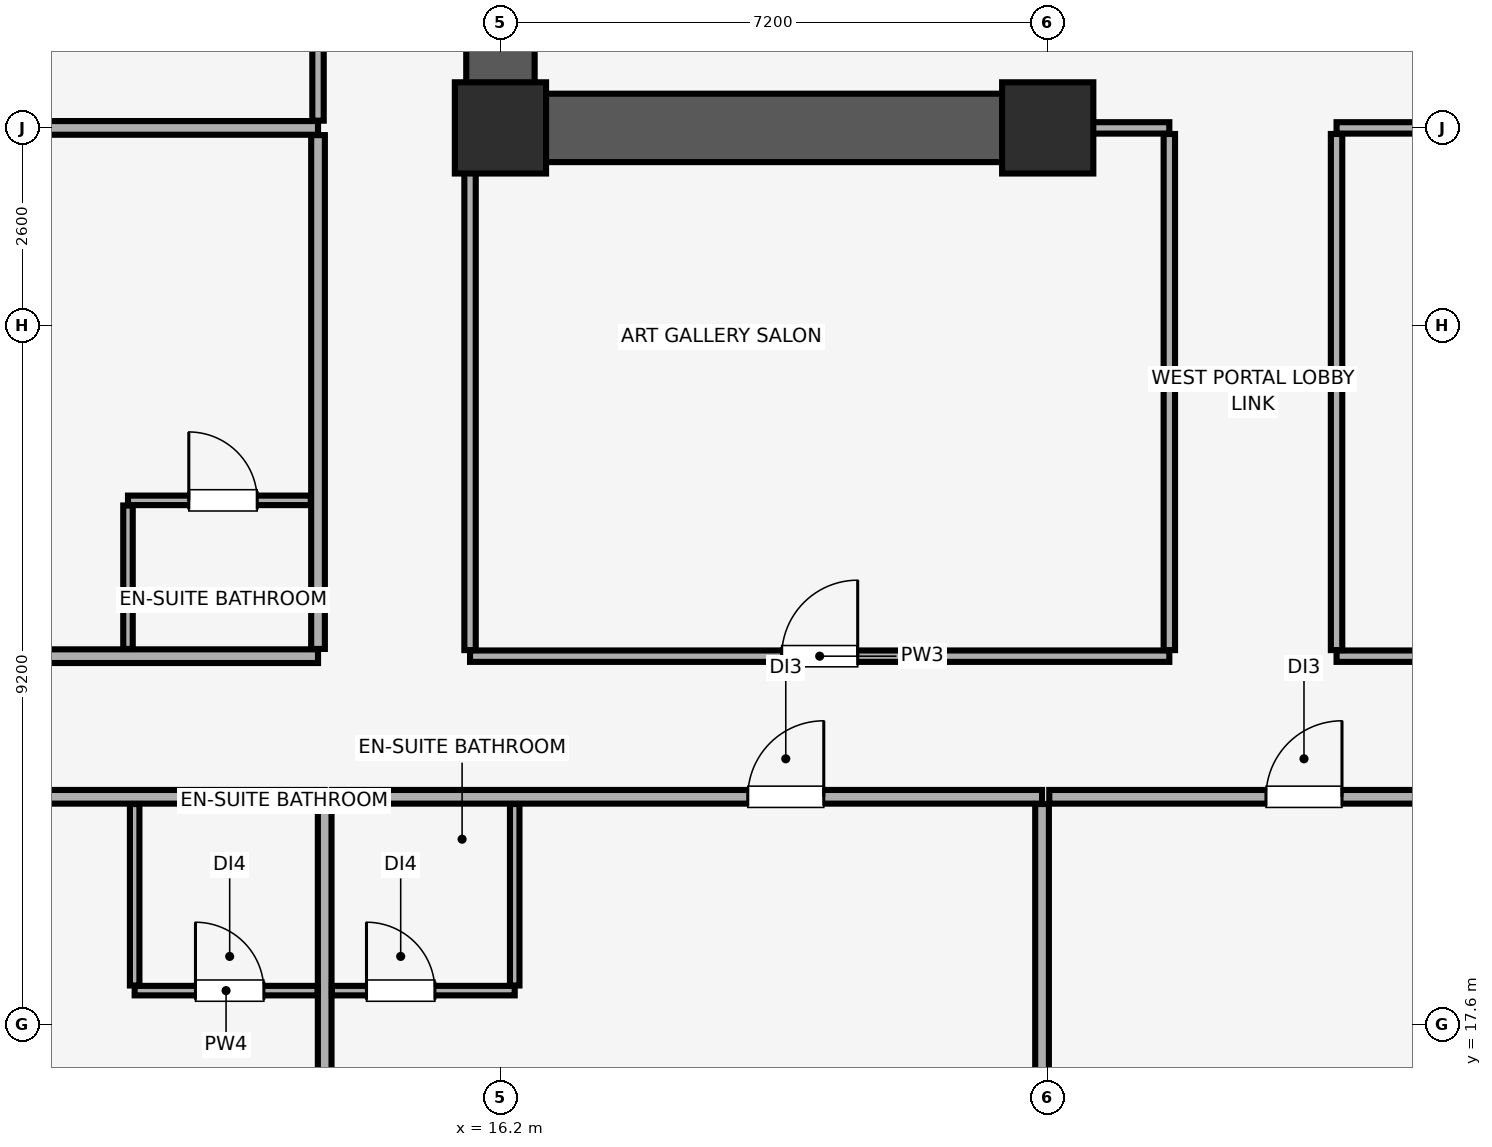
"""IFC4 building model, lengths in metres.
Left out: names, types, materials, properties, quantities, classifications, styles, units other than length and angle.
Written with IfcOpenShell. Run it as: python <this file> out.ifc"""

import sys

from ifc_helpers import new_model, si_unit, direction, frame, frame_2d, origin, origin_2d, place, context, subcontext, project, spatial, rectangle, extrude, element, fill, save


model = new_model("IFC4")
c1 = context("Model", 3, precision=1e-05, world=origin(), true_north=direction((0.0, 1.0)))
c2 = subcontext(c1, "Body", "Model", "MODEL_VIEW")
j1 = project(units=[si_unit("LENGTHUNIT", "METRE"), si_unit("PLANEANGLEUNIT", "RADIAN")], contexts=[c1])
p1 = place(None, origin())
s1 = spatial("IfcSite", under=j1, at=p1, CompositionType="ELEMENT")
p2 = place(p1, origin())
s2 = spatial("IfcBuilding", under=s1, at=p2, CompositionType="ELEMENT")
p3 = place(p2, frame((0.0, 0.0, 93.05)))
s3 = spatial("IfcBuildingStorey", under=s2, at=p3, CompositionType="ELEMENT", Elevation=93.05)
for number, where, z_axis, x_axis in (
    (1, (16.2, 29.4, 0.0), (0.0, 0.0, 1.0), (1.0, 0.0, 0.0)),
    (2, (23.4, 29.4, 0.0), (0.0, 0.0, 1.0), (1.0, 0.0, 0.0)),
):
    element("IfcColumn", number, at=place(p3, frame(where, z_axis=z_axis, x_axis=x_axis)), inside=s3, PredefinedType="COLUMN", context=c2, shape_type="SweptSolid", body=[
        extrude(rectangle(XDim=1.2, YDim=1.2, at=origin_2d()), origin(), (0.0, 0.0, 1.0), 3.51),
    ])
p4 = place(p3, frame((16.2, 29.4, 0.0), z_axis=(0.0, 0.0, 1.0), x_axis=(0.0, 1.0, 0.0)))
e3 = element("IfcWall", 3, at=p4, inside=s3, PredefinedType="SHEAR", context=c2, shape_type="SweptSolid", body=[
    extrude(rectangle(XDim=19.2, YDim=0.9, at=frame_2d((9.6, 0.0))), origin(), (0.0, 0.0, 1.0), 3.51),
])
p5 = place(p3, frame((16.655, 29.4, 0.0), z_axis=(0.0, 0.0, 1.0), x_axis=(1.0, 0.0, 0.0)))
e4 = element("IfcWall", 4, at=p5, inside=s3, PredefinedType="SHEAR", context=c2, shape_type="SweptSolid", body=[
    extrude(rectangle(XDim=6.945, YDim=0.9, at=frame_2d((3.473, 0.0))), origin(), (0.0, 0.0, 1.0), 3.51),
])
p6 = place(p3, frame((0.15, 20.6, 0.0), z_axis=(0.0, 0.0, 1.0), x_axis=(1.0, 0.0, 0.0)))
e5 = element("IfcWall", 5, at=p6, inside=s3, PredefinedType="PARTITIONING", context=c2, shape_type="SweptSolid", body=[
    extrude(rectangle(XDim=13.738, YDim=0.18, at=frame_2d((6.869, 0.0))), origin(), (0.0, 0.0, 1.0), 3.51),
])
p7 = place(p6, frame((5.685, 0.0, 0.0)))
e6 = element("IfcOpeningElement", 6, at=p7, cuts=e5, PredefinedType="OPENING", context=c2, shape_type="SweptSolid", body=[
    extrude(rectangle(XDim=1.0, YDim=2.15, at=frame_2d((0.5, 1.075))), frame((0.0, 0.1, 0.0), z_axis=(0.0, -1.0, 0.0), x_axis=(1.0, 0.0, 0.0)), (0.0, 0.0, 1.0), 0.2),
])
p8 = place(p3, frame((13.888, 0.15, 0.0), z_axis=(0.0, 0.0, 1.0), x_axis=(0.0, 1.0, 0.0)))
e7 = element("IfcWall", 7, at=p8, inside=s3, PredefinedType="PARTITIONING", context=c2, shape_type="SweptSolid", body=[
    extrude(rectangle(XDim=20.355, YDim=0.18, at=frame_2d((10.177, 0.0))), origin(), (0.0, 0.0, 1.0), 3.51),
])
p9 = place(p3, frame((11.388, 18.05, 0.0), z_axis=(0.0, 0.0, 1.0), x_axis=(1.0, 0.0, 0.0)))
e8 = element("IfcWall", 8, at=p9, inside=s3, PredefinedType="PARTITIONING", context=c2, shape_type="SweptSolid", body=[
    extrude(rectangle(XDim=2.405, YDim=0.125, at=frame_2d((1.203, 0.0))), origin(), (0.0, 0.0, 1.0), 3.51),
])
p10 = place(p9, frame((0.8, 0.0, 0.0)))
e9 = element("IfcOpeningElement", 9, at=p10, cuts=e8, PredefinedType="OPENING", context=c2, shape_type="SweptSolid", body=[
    extrude(rectangle(XDim=0.9, YDim=2.1, at=frame_2d((0.45, 1.05))), frame((0.0, 0.073, 0.0), z_axis=(0.0, -1.0, 0.0), x_axis=(1.0, 0.0, 0.0)), (0.0, 0.0, 1.0), 0.145),
])
p11 = place(p3, frame((11.388, 18.117, 0.0), z_axis=(0.0, 0.0, 1.0), x_axis=(0.0, 1.0, 0.0)))
e10 = element("IfcWall", 10, at=p11, inside=s3, PredefinedType="PARTITIONING", context=c2, shape_type="SweptSolid", body=[
    extrude(rectangle(XDim=2.387, YDim=0.125, at=frame_2d((1.194, 0.0))), origin(), (0.0, 0.0, 1.0), 3.51),
])
p12 = place(p3, frame((13.983, 20.6, 0.0), z_axis=(0.0, 0.0, 1.0), x_axis=(1.0, 0.0, 0.0)))
e11 = element("IfcWall", 11, at=p12, inside=s3, PredefinedType="PARTITIONING", context=c2, shape_type="SweptSolid", body=[
    extrude(rectangle(XDim=9.343, YDim=0.18, at=frame_2d((4.671, 0.0))), origin(), (0.0, 0.0, 1.0), 3.51),
])
p13 = place(p12, frame((5.471, 0.0, 0.0)))
e12 = element("IfcOpeningElement", 12, at=p13, cuts=e11, PredefinedType="OPENING", context=c2, shape_type="SweptSolid", body=[
    extrude(rectangle(XDim=1.0, YDim=2.15, at=frame_2d((0.5, 1.075))), frame((0.0, 0.1, 0.0), z_axis=(0.0, -1.0, 0.0), x_axis=(1.0, 0.0, 0.0)), (0.0, 0.0, 1.0), 0.2),
])
p14 = place(p3, frame((23.325, 0.15, 0.0), z_axis=(0.0, 0.0, 1.0), x_axis=(0.0, 1.0, 0.0)))
e13 = element("IfcWall", 13, at=p14, inside=s3, PredefinedType="PARTITIONING", context=c2, shape_type="SweptSolid", body=[
    extrude(rectangle(XDim=20.355, YDim=0.18, at=frame_2d((10.177, 0.0))), origin(), (0.0, 0.0, 1.0), 2.898),
])
p15 = place(p3, frame((13.983, 18.05, 0.0), z_axis=(0.0, 0.0, 1.0), x_axis=(1.0, 0.0, 0.0)))
e14 = element("IfcWall", 14, at=p15, inside=s3, PredefinedType="PARTITIONING", context=c2, shape_type="SweptSolid", body=[
    extrude(rectangle(XDim=2.405, YDim=0.125, at=frame_2d((1.203, 0.0))), origin(), (0.0, 0.0, 1.0), 3.51),
])
p16 = place(p15, frame((0.455, 0.0, 0.0)))
e15 = element("IfcOpeningElement", 15, at=p16, cuts=e14, PredefinedType="OPENING", context=c2, shape_type="SweptSolid", body=[
    extrude(rectangle(XDim=0.9, YDim=2.1, at=frame_2d((0.45, 1.05))), frame((0.0, 0.073, 0.0), z_axis=(0.0, -1.0, 0.0), x_axis=(1.0, 0.0, 0.0)), (0.0, 0.0, 1.0), 0.145),
])
p17 = place(p3, frame((16.388, 18.117, 0.0), z_axis=(0.0, 0.0, 1.0), x_axis=(0.0, 1.0, 0.0)))
e16 = element("IfcWall", 16, at=p17, inside=s3, PredefinedType="PARTITIONING", context=c2, shape_type="SweptSolid", body=[
    extrude(rectangle(XDim=2.387, YDim=0.125, at=frame_2d((1.194, 0.0))), origin(), (0.0, 0.0, 1.0), 2.977),
])
p18 = place(p3, frame((23.42, 20.6, 0.0), z_axis=(0.0, 0.0, 1.0), x_axis=(1.0, 0.0, 0.0)))
e17 = element("IfcWall", 17, at=p18, inside=s3, PredefinedType="PARTITIONING", context=c2, shape_type="SweptSolid", body=[
    extrude(rectangle(XDim=9.343, YDim=0.18, at=frame_2d((4.671, 0.0))), origin(), (0.0, 0.0, 1.0), 3.51),
])
p19 = place(p18, frame((2.851, 0.0, 0.0)))
e18 = element("IfcOpeningElement", 18, at=p19, cuts=e17, PredefinedType="OPENING", context=c2, shape_type="SweptSolid", body=[
    extrude(rectangle(XDim=1.0, YDim=2.15, at=frame_2d((0.5, 1.075))), frame((0.0, 0.1, 0.0), z_axis=(0.0, -1.0, 0.0), x_axis=(1.0, 0.0, 0.0)), (0.0, 0.0, 1.0), 0.2),
])
p20 = place(p3, frame((15.8, 22.45, 0.0), z_axis=(0.0, 0.0, 1.0), x_axis=(1.0, 0.0, 0.0)))
e19 = element("IfcWall", 19, at=p20, inside=s3, PredefinedType="PARTITIONING", context=c2, shape_type="SweptSolid", body=[
    extrude(rectangle(XDim=9.2, YDim=0.15, at=frame_2d((4.6, 0.0))), origin(), (0.0, 0.0, 1.0), 3.51),
])
p21 = place(p20, frame((4.1, 0.0, 0.0)))
e20 = element("IfcOpeningElement", 20, at=p21, cuts=e19, PredefinedType="OPENING", context=c2, shape_type="SweptSolid", body=[
    extrude(rectangle(XDim=1.0, YDim=2.15, at=frame_2d((0.5, 1.075))), frame((0.0, 0.085, 0.0), z_axis=(0.0, -1.0, 0.0), x_axis=(1.0, 0.0, 0.0)), (0.0, 0.0, 1.0), 0.17),
])
p22 = place(p3, frame((23.61, 29.4, 0.0), z_axis=(0.0, 0.0, 1.0), x_axis=(1.0, 0.0, 0.0)))
e21 = element("IfcWall", 21, at=p22, inside=s3, PredefinedType="PARTITIONING", context=c2, shape_type="SweptSolid", body=[
    extrude(rectangle(XDim=1.39, YDim=0.15, at=frame_2d((0.695, 0.0))), origin(), (0.0, 0.0, 1.0), 2.41),
])
p23 = place(p3, frame((15.8, 22.53, 0.0), z_axis=(0.0, 0.0, 1.0), x_axis=(0.0, 1.0, 0.0)))
e22 = element("IfcWall", 22, at=p23, inside=s3, PredefinedType="PARTITIONING", context=c2, shape_type="SweptSolid", body=[
    extrude(rectangle(XDim=6.86, YDim=0.15, at=frame_2d((3.43, 0.0))), origin(), (0.0, 0.0, 1.0), 3.51),
])
p24 = place(p3, frame((25.0, 22.53, 0.0), z_axis=(0.0, 0.0, 1.0), x_axis=(0.0, 1.0, 0.0)))
e23 = element("IfcWall", 23, at=p24, inside=s3, PredefinedType="PARTITIONING", context=c2, shape_type="SweptSolid", body=[
    extrude(rectangle(XDim=6.79, YDim=0.15, at=frame_2d((3.395, 0.0))), origin(), (0.0, 0.0, 1.0), 3.51),
])
p25 = place(p3, frame((27.2, 22.45, 0.0), z_axis=(0.0, 0.0, 1.0), x_axis=(1.0, 0.0, 0.0)))
e24 = element("IfcWall", 24, at=p25, inside=s3, PredefinedType="PARTITIONING", context=c2, shape_type="SweptSolid", body=[
    extrude(rectangle(XDim=13.9, YDim=0.15, at=frame_2d((6.95, 0.0))), origin(), (0.0, 0.0, 1.0), 3.51),
])
p26 = place(p25, frame((6.45, 0.0, 0.0)))
e25 = element("IfcOpeningElement", 25, at=p26, cuts=e24, PredefinedType="OPENING", context=c2, shape_type="SweptSolid", body=[
    extrude(rectangle(XDim=1.0, YDim=2.15, at=frame_2d((0.5, 1.075))), frame((0.0, 0.085, 0.0), z_axis=(0.0, -1.0, 0.0), x_axis=(1.0, 0.0, 0.0)), (0.0, 0.0, 1.0), 0.17),
])
p27 = place(p3, frame((27.2, 29.4, 0.0), z_axis=(0.0, 0.0, 1.0), x_axis=(1.0, 0.0, 0.0)))
e26 = element("IfcWall", 26, at=p27, inside=s3, PredefinedType="PARTITIONING", context=c2, shape_type="SweptSolid", body=[
    extrude(rectangle(XDim=3.19, YDim=0.15, at=frame_2d((1.595, 0.0))), origin(), (0.0, 0.0, 1.0), 2.41),
])
p28 = place(p3, frame((27.2, 22.53, 0.0), z_axis=(0.0, 0.0, 1.0), x_axis=(0.0, 1.0, 0.0)))
e27 = element("IfcWall", 27, at=p28, inside=s3, PredefinedType="PARTITIONING", context=c2, shape_type="SweptSolid", body=[
    extrude(rectangle(XDim=6.79, YDim=0.15, at=frame_2d((3.395, 0.0))), origin(), (0.0, 0.0, 1.0), 2.977),
])
p29 = place(p3, frame((0.15, 22.45, 0.0), z_axis=(0.0, 0.0, 1.0), x_axis=(1.0, 0.0, 0.0)))
e28 = element("IfcWall", 28, at=p29, inside=s3, PredefinedType="PARTITIONING", context=c2, shape_type="SweptSolid", body=[
    extrude(rectangle(XDim=13.65, YDim=0.18, at=frame_2d((6.825, 0.0))), origin(), (0.0, 0.0, 1.0), 3.51),
])
p30 = place(p29, frame((5.685, 0.0, 0.0)))
e29 = element("IfcOpeningElement", 29, at=p30, cuts=e28, PredefinedType="OPENING", context=c2, shape_type="SweptSolid", body=[
    extrude(rectangle(XDim=1.0, YDim=2.15, at=frame_2d((0.5, 1.075))), frame((0.0, 0.1, 0.0), z_axis=(0.0, -1.0, 0.0), x_axis=(1.0, 0.0, 0.0)), (0.0, 0.0, 1.0), 0.2),
])
p31 = place(p3, frame((0.15, 29.4, 0.0), z_axis=(0.0, 0.0, 1.0), x_axis=(1.0, 0.0, 0.0)))
e30 = element("IfcWall", 30, at=p31, inside=s3, PredefinedType="PARTITIONING", context=c2, shape_type="SweptSolid", body=[
    extrude(rectangle(XDim=13.65, YDim=0.18, at=frame_2d((6.825, 0.0))), origin(), (0.0, 0.0, 1.0), 2.86),
])
p32 = place(p3, frame((13.8, 22.545, 0.0), z_axis=(0.0, 0.0, 1.0), x_axis=(0.0, 1.0, 0.0)))
e31 = element("IfcWall", 31, at=p32, inside=s3, PredefinedType="PARTITIONING", context=c2, shape_type="SweptSolid", body=[
    extrude(rectangle(XDim=6.76, YDim=0.18, at=frame_2d((3.38, 0.0))), origin(), (0.0, 0.0, 1.0), 3.51),
])
p33 = place(p3, frame((11.3, 24.5, 0.0), z_axis=(0.0, 0.0, 1.0), x_axis=(1.0, 0.0, 0.0)))
e32 = element("IfcWall", 32, at=p33, inside=s3, PredefinedType="PARTITIONING", context=c2, shape_type="SweptSolid", body=[
    extrude(rectangle(XDim=2.405, YDim=0.125, at=frame_2d((1.203, 0.0))), origin(), (0.0, 0.0, 1.0), 3.51),
])
p34 = place(p33, frame((0.8, 0.0, 0.0)))
e33 = element("IfcOpeningElement", 33, at=p34, cuts=e32, PredefinedType="OPENING", context=c2, shape_type="SweptSolid", body=[
    extrude(rectangle(XDim=0.9, YDim=2.1, at=frame_2d((0.45, 1.05))), frame((0.0, 0.073, 0.0), z_axis=(0.0, -1.0, 0.0), x_axis=(1.0, 0.0, 0.0)), (0.0, 0.0, 1.0), 0.145),
])
p35 = place(p3, frame((11.3, 22.545, 0.0), z_axis=(0.0, 0.0, 1.0), x_axis=(0.0, 1.0, 0.0)))
e34 = element("IfcWall", 34, at=p35, inside=s3, PredefinedType="PARTITIONING", context=c2, shape_type="SweptSolid", body=[
    extrude(rectangle(XDim=1.888, YDim=0.125, at=frame_2d((0.944, 0.0))), origin(), (0.0, 0.0, 1.0), 3.51),
])
p36 = place(p3, frame((13.8, 29.495, 0.0), z_axis=(0.0, 0.0, 1.0), x_axis=(0.0, 1.0, 0.0)))
e35 = element("IfcWall", 35, at=p36, inside=s3, PredefinedType="PARTITIONING", context=c2, shape_type="SweptSolid", body=[
    extrude(rectangle(XDim=19.355, YDim=0.15, at=frame_2d((9.677, 0.0))), origin(), (0.0, 0.0, 1.0), 3.51),
])
p37 = place(p36, frame((5.255, 0.0, 0.0)))
e36 = element("IfcOpeningElement", 36, at=p37, cuts=e35, PredefinedType="OPENING", context=c2, shape_type="SweptSolid", body=[
    extrude(rectangle(XDim=1.5, YDim=2.25, at=frame_2d((0.75, 1.125))), frame((0.0, 0.085, 0.0), z_axis=(0.0, -1.0, 0.0), x_axis=(1.0, 0.0, 0.0)), (0.0, 0.0, 1.0), 0.17),
])
p38 = place(p10, origin())
e37 = element("IfcDoor", 37, at=p38, inside=s3, OperationType="SINGLE_SWING_LEFT", PredefinedType="DOOR", context=c2, shape_type="SweptSolid", body=[
    extrude(rectangle(XDim=0.9, YDim=2.1, at=frame_2d((0.45, 1.05))), frame((0.0, 0.025, 0.0), z_axis=(0.0, -1.0, 0.0), x_axis=(1.0, 0.0, 0.0)), (0.0, 0.0, 1.0), 0.05),
])
fill(e9, e37)
p39 = place(p13, origin())
e38 = element("IfcDoor", 38, at=p39, inside=s3, OperationType="SINGLE_SWING_RIGHT", PredefinedType="DOOR", context=c2, shape_type="SweptSolid", body=[
    extrude(rectangle(XDim=1.0, YDim=2.15, at=frame_2d((0.5, 1.075))), frame((0.0, 0.025, 0.0), z_axis=(0.0, -1.0, 0.0), x_axis=(1.0, 0.0, 0.0)), (0.0, 0.0, 1.0), 0.05),
])
fill(e12, e38)
p40 = place(p16, origin())
e39 = element("IfcDoor", 39, at=p40, inside=s3, OperationType="SINGLE_SWING_LEFT", PredefinedType="DOOR", context=c2, shape_type="SweptSolid", body=[
    extrude(rectangle(XDim=0.9, YDim=2.1, at=frame_2d((0.45, 1.05))), frame((0.0, 0.025, 0.0), z_axis=(0.0, -1.0, 0.0), x_axis=(1.0, 0.0, 0.0)), (0.0, 0.0, 1.0), 0.05),
])
fill(e15, e39)
p41 = place(p19, origin())
e40 = element("IfcDoor", 40, at=p41, inside=s3, OperationType="SINGLE_SWING_RIGHT", PredefinedType="DOOR", context=c2, shape_type="SweptSolid", body=[
    extrude(rectangle(XDim=1.0, YDim=2.15, at=frame_2d((0.5, 1.075))), frame((0.0, 0.025, 0.0), z_axis=(0.0, -1.0, 0.0), x_axis=(1.0, 0.0, 0.0)), (0.0, 0.0, 1.0), 0.05),
])
fill(e18, e40)
p42 = place(p21, origin())
e41 = element("IfcDoor", 41, at=p42, inside=s3, OperationType="SINGLE_SWING_RIGHT", PredefinedType="DOOR", context=c2, shape_type="SweptSolid", body=[
    extrude(rectangle(XDim=1.0, YDim=2.15, at=frame_2d((0.5, 1.075))), frame((0.0, 0.025, 0.0), z_axis=(0.0, -1.0, 0.0), x_axis=(1.0, 0.0, 0.0)), (0.0, 0.0, 1.0), 0.05),
])
fill(e20, e41)
p43 = place(p34, origin())
e42 = element("IfcDoor", 42, at=p43, inside=s3, OperationType="SINGLE_SWING_LEFT", PredefinedType="DOOR", context=c2, shape_type="SweptSolid", body=[
    extrude(rectangle(XDim=0.9, YDim=2.1, at=frame_2d((0.45, 1.05))), frame((0.0, 0.025, 0.0), z_axis=(0.0, -1.0, 0.0), x_axis=(1.0, 0.0, 0.0)), (0.0, 0.0, 1.0), 0.05),
])
fill(e33, e42)
save(model, sys.argv[1])
